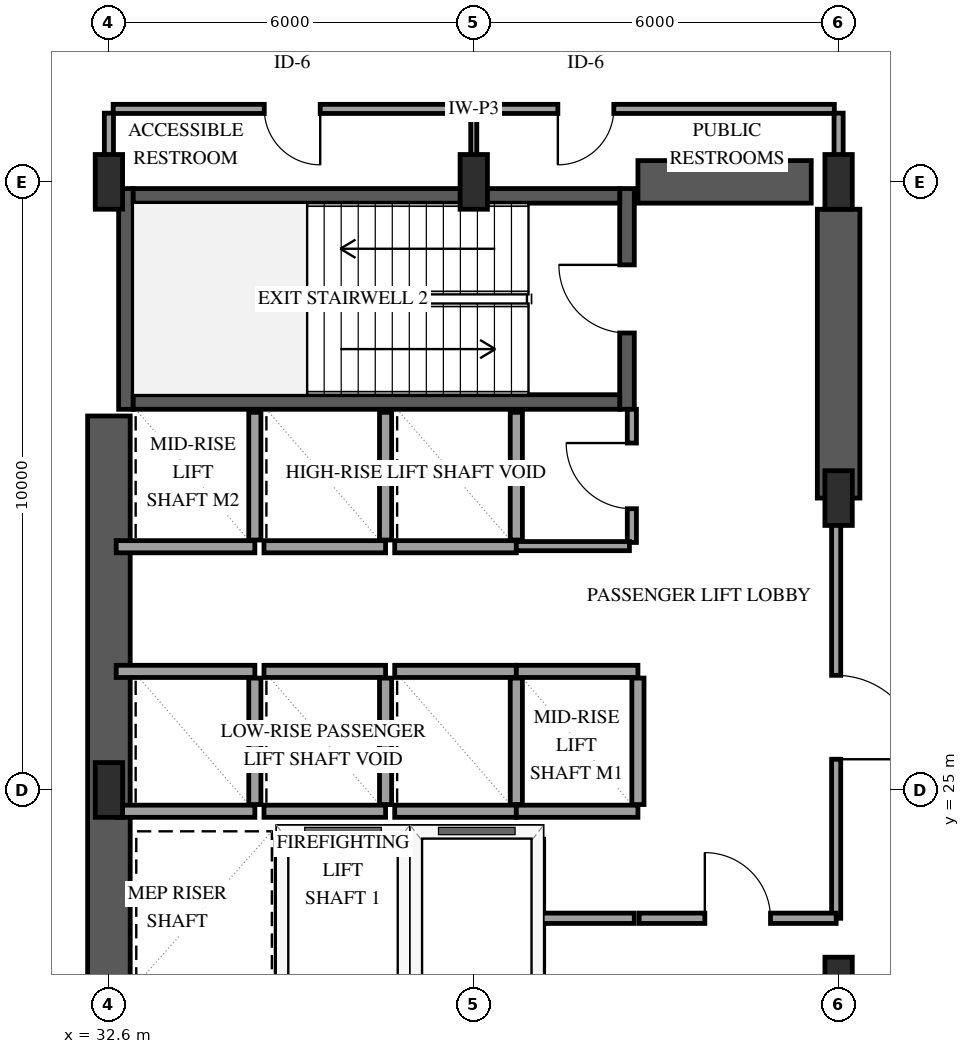
"""IFC4 building model, lengths in metres.
Left out: names, types, materials, properties, quantities, classifications, styles, units other than length and angle.
Written with IfcOpenShell. Run it as: python <this file> out.ifc"""

import sys

from ifc_helpers import new_model, si_unit, direction, frame, frame_2d, origin, origin_2d, place, context, subcontext, project, spatial, rectangle, extrude, element, fill, save


model = new_model("IFC4")
c1 = context("Model", 3, precision=1e-05, world=origin(), true_north=direction((0.0, 1.0)))
c2 = subcontext(c1, "Body", "Model", "MODEL_VIEW")
j1 = project(units=[si_unit("LENGTHUNIT", "METRE"), si_unit("PLANEANGLEUNIT", "RADIAN")], contexts=[c1])
p1 = place(None, origin())
s1 = spatial("IfcSite", under=j1, at=p1, CompositionType="ELEMENT")
p2 = place(p1, origin())
s2 = spatial("IfcBuilding", under=s1, at=p2, CompositionType="ELEMENT")
p3 = place(p2, frame((0.0, 0.0, 11.4)))
s3 = spatial("IfcBuildingStorey", under=s2, at=p3, CompositionType="ELEMENT", Elevation=11.4)
p4 = place(p3, frame((32.88, 31.26, 0.0), z_axis=(0.0, 0.0, 1.0), x_axis=(0.0, 1.0, 0.0)))
e1 = element("IfcWall", 1, at=p4, inside=s3, PredefinedType="SHEAR", context=c2, shape_type="SweptSolid", body=[
    extrude(rectangle(XDim=3.63, YDim=0.24, at=frame_2d((1.815, 0.0))), origin(), (0.0, 0.0, 1.0), 4.8),
])
p5 = place(p3, frame((41.12, 31.26, 0.0), z_axis=(0.0, 0.0, 1.0), x_axis=(0.0, 1.0, 0.0)))
e2 = element("IfcWall", 2, at=p5, inside=s3, PredefinedType="SHEAR", context=c2, shape_type="SweptSolid", body=[
    extrude(rectangle(XDim=3.63, YDim=0.24, at=frame_2d((1.815, 0.0))), origin(), (0.0, 0.0, 1.0), 4.8),
])
p6 = place(p5, frame((1.255, 0.0, 0.0)))
e3 = element("IfcOpeningElement", 3, at=p6, cuts=e2, PredefinedType="OPENING", context=c2, shape_type="SweptSolid", body=[
    extrude(rectangle(XDim=1.12, YDim=2.15, at=frame_2d((0.56, 1.075))), frame((0.0, 0.13, 0.0), z_axis=(0.0, -1.0, 0.0), x_axis=(1.0, 0.0, 0.0)), (0.0, 0.0, 1.0), 0.26),
])
for number, where, z_axis, x_axis in (
    (4, (33.0, 31.38, 0.0), (0.0, 0.0, 1.0), (1.0, 0.0, 0.0)),
    (5, (33.0, 34.77, 0.0), (0.0, 0.0, 1.0), (1.0, 0.0, 0.0)),
):
    element("IfcWall", number, at=place(p3, frame(where, z_axis=z_axis, x_axis=x_axis)), inside=s3, PredefinedType="SHEAR", context=c2, shape_type="SweptSolid", body=[
        extrude(rectangle(XDim=8.0, YDim=0.24, at=frame_2d((4.0, 0.0))), origin(), (0.0, 0.0, 1.0), 4.8),
    ])
p7 = place(p3, frame((32.6, 18.85, 0.0), z_axis=(0.0, 0.0, 1.0), x_axis=(0.0, 1.0, 0.0)))
e6 = element("IfcWall", 6, at=p7, inside=s3, PredefinedType="SHEAR", context=c2, shape_type="SweptSolid", body=[
    extrude(rectangle(XDim=12.3, YDim=0.7, at=frame_2d((6.15, 0.0))), origin(), (0.0, 0.0, 1.0), 4.8),
])
p8 = place(p3, frame((41.3, 35.0, 0.0), z_axis=(0.0, 0.0, 1.0), x_axis=(1.0, 0.0, 0.0)))
e7 = element("IfcWall", 7, at=p8, inside=s3, PredefinedType="SHEAR", context=c2, shape_type="SweptSolid", body=[
    extrude(rectangle(XDim=2.85, YDim=0.7, at=frame_2d((1.425, 0.0))), origin(), (0.0, 0.0, 1.0), 4.8),
])
p9 = place(p3, frame((44.6, 29.8, 0.0), z_axis=(0.0, 0.0, 1.0), x_axis=(0.0, 1.0, 0.0)))
e8 = element("IfcWall", 8, at=p9, inside=s3, PredefinedType="SHEAR", context=c2, shape_type="SweptSolid", body=[
    extrude(rectangle(XDim=4.75, YDim=0.7, at=frame_2d((2.375, 0.0))), origin(), (0.0, 0.0, 1.0), 4.8),
])
for number, where, z_axis, x_axis in (
    (9, (32.6, 25.0, 0.0), (0.0, 0.0, 1.0), (1.0, 0.0, 0.0)),
    (10, (32.6, 35.0, 0.0), (0.0, 0.0, 1.0), (1.0, 0.0, 0.0)),
    (11, (38.6, 35.0, 0.0), (0.0, 0.0, 1.0), (1.0, 0.0, 0.0)),
    (12, (44.6, 21.8, 0.0), (0.0, 0.0, 1.0), (1.0, 0.0, 0.0)),
    (13, (44.6, 29.8, 0.0), (0.0, 0.0, 1.0), (1.0, 0.0, 0.0)),
    (14, (44.6, 35.0, 0.0), (0.0, 0.0, 1.0), (1.0, 0.0, 0.0)),
):
    element("IfcColumn", number, at=place(p3, frame(where, z_axis=z_axis, x_axis=x_axis)), inside=s3, PredefinedType="PILASTER", context=c2, shape_type="SweptSolid", body=[
        extrude(rectangle(XDim=0.45, YDim=0.9, at=origin_2d()), origin(), (0.0, 0.0, 1.0), 4.8),
    ])
p10 = place(p3, frame((35.45, 24.3, 0.0), z_axis=(0.0, 0.0, 1.0), x_axis=(1.0, 0.0, 0.0)))
e15 = element("IfcWall", 15, at=p10, inside=s3, PredefinedType="SOLIDWALL", context=c2, shape_type="SweptSolid", body=[
    extrude(rectangle(XDim=2.0, YDim=0.2, at=frame_2d((1.0, 0.0))), origin(), (0.0, 0.0, 1.0), 4.48),
])
for number, where, z_axis, x_axis in (
    (16, (35.45, 21.81, 0.0), (0.0, 0.0, 1.0), (0.0, 1.0, 0.0)),
    (17, (37.45, 21.81, 0.0), (0.0, 0.0, 1.0), (0.0, 1.0, 0.0)),
):
    element("IfcWall", number, at=place(p3, frame(where, z_axis=z_axis, x_axis=x_axis)), inside=s3, PredefinedType="SOLIDWALL", context=c2, shape_type="SweptSolid", body=[
        extrude(rectangle(XDim=2.38, YDim=0.2, at=frame_2d((1.19, 0.0))), origin(), (0.0, 0.0, 1.0), 4.48),
    ])
p11 = place(p3, frame((37.65, 24.3, 0.0), z_axis=(0.0, 0.0, 1.0), x_axis=(1.0, 0.0, 0.0)))
e18 = element("IfcWall", 18, at=p11, inside=s3, PredefinedType="SOLIDWALL", context=c2, shape_type="SweptSolid", body=[
    extrude(rectangle(XDim=2.0, YDim=0.2, at=frame_2d((1.0, 0.0))), origin(), (0.0, 0.0, 1.0), 4.48),
])
p12 = place(p3, frame((39.65, 21.81, 0.0), z_axis=(0.0, 0.0, 1.0), x_axis=(0.0, 1.0, 0.0)))
e19 = element("IfcWall", 19, at=p12, inside=s3, PredefinedType="SOLIDWALL", context=c2, shape_type="SweptSolid", body=[
    extrude(rectangle(XDim=2.38, YDim=0.2, at=frame_2d((1.19, 0.0))), origin(), (0.0, 0.0, 1.0), 4.48),
])
for number, where, z_axis, x_axis in (
    (20, (32.72, 24.65, 0.0), (0.0, 0.0, 1.0), (1.0, 0.0, 0.0)),
    (21, (32.72, 26.95, 0.0), (0.0, 0.0, 1.0), (1.0, 0.0, 0.0)),
):
    element("IfcWall", number, at=place(p3, frame(where, z_axis=z_axis, x_axis=x_axis)), inside=s3, PredefinedType="SOLIDWALL", context=c2, shape_type="SweptSolid", body=[
        extrude(rectangle(XDim=2.28, YDim=0.2, at=frame_2d((1.14, 0.0))), origin(), (0.0, 0.0, 1.0), 4.48),
    ])
p13 = place(p3, frame((35.0, 24.76, 0.0), z_axis=(0.0, 0.0, 1.0), x_axis=(0.0, 1.0, 0.0)))
e22 = element("IfcWall", 22, at=p13, inside=s3, PredefinedType="SOLIDWALL", context=c2, shape_type="SweptSolid", body=[
    extrude(rectangle(XDim=2.08, YDim=0.2, at=frame_2d((1.04, 0.0))), origin(), (0.0, 0.0, 1.0), 4.48),
])
for number, where, z_axis, x_axis in (
    (23, (35.15, 24.65, 0.0), (0.0, 0.0, 1.0), (1.0, 0.0, 0.0)),
    (24, (35.15, 26.95, 0.0), (0.0, 0.0, 1.0), (1.0, 0.0, 0.0)),
):
    element("IfcWall", number, at=place(p3, frame(where, z_axis=z_axis, x_axis=x_axis)), inside=s3, PredefinedType="SOLIDWALL", context=c2, shape_type="SweptSolid", body=[
        extrude(rectangle(XDim=2.0, YDim=0.2, at=frame_2d((1.0, 0.0))), origin(), (0.0, 0.0, 1.0), 4.48),
    ])
p14 = place(p3, frame((37.15, 24.76, 0.0), z_axis=(0.0, 0.0, 1.0), x_axis=(0.0, 1.0, 0.0)))
e25 = element("IfcWall", 25, at=p14, inside=s3, PredefinedType="SOLIDWALL", context=c2, shape_type="SweptSolid", body=[
    extrude(rectangle(XDim=2.08, YDim=0.2, at=frame_2d((1.04, 0.0))), origin(), (0.0, 0.0, 1.0), 4.48),
])
for number, where, z_axis, x_axis in (
    (26, (37.3, 24.65, 0.0), (0.0, 0.0, 1.0), (1.0, 0.0, 0.0)),
    (27, (37.3, 26.95, 0.0), (0.0, 0.0, 1.0), (1.0, 0.0, 0.0)),
):
    element("IfcWall", number, at=place(p3, frame(where, z_axis=z_axis, x_axis=x_axis)), inside=s3, PredefinedType="SOLIDWALL", context=c2, shape_type="SweptSolid", body=[
        extrude(rectangle(XDim=2.0, YDim=0.2, at=frame_2d((1.0, 0.0))), origin(), (0.0, 0.0, 1.0), 4.48),
    ])
p15 = place(p3, frame((39.3, 24.76, 0.0), z_axis=(0.0, 0.0, 1.0), x_axis=(0.0, 1.0, 0.0)))
e28 = element("IfcWall", 28, at=p15, inside=s3, PredefinedType="SOLIDWALL", context=c2, shape_type="SweptSolid", body=[
    extrude(rectangle(XDim=2.08, YDim=0.2, at=frame_2d((1.04, 0.0))), origin(), (0.0, 0.0, 1.0), 4.48),
])
for number, where, z_axis, x_axis in (
    (29, (39.3, 24.65, 0.0), (0.0, 0.0, 1.0), (1.0, 0.0, 0.0)),
    (30, (39.3, 26.95, 0.0), (0.0, 0.0, 1.0), (1.0, 0.0, 0.0)),
):
    element("IfcWall", number, at=place(p3, frame(where, z_axis=z_axis, x_axis=x_axis)), inside=s3, PredefinedType="SOLIDWALL", context=c2, shape_type="SweptSolid", body=[
        extrude(rectangle(XDim=2.0, YDim=0.2, at=frame_2d((1.0, 0.0))), origin(), (0.0, 0.0, 1.0), 4.48),
    ])
p16 = place(p3, frame((41.3, 24.76, 0.0), z_axis=(0.0, 0.0, 1.0), x_axis=(0.0, 1.0, 0.0)))
e31 = element("IfcWall", 31, at=p16, inside=s3, PredefinedType="SOLIDWALL", context=c2, shape_type="SweptSolid", body=[
    extrude(rectangle(XDim=2.08, YDim=0.2, at=frame_2d((1.04, 0.0))), origin(), (0.0, 0.0, 1.0), 4.48),
])
p17 = place(p3, frame((32.72, 29.0, 0.0), z_axis=(0.0, 0.0, 1.0), x_axis=(1.0, 0.0, 0.0)))
e32 = element("IfcWall", 32, at=p17, inside=s3, PredefinedType="SOLIDWALL", context=c2, shape_type="SweptSolid", body=[
    extrude(rectangle(XDim=2.28, YDim=0.2, at=frame_2d((1.14, 0.0))), origin(), (0.0, 0.0, 1.0), 4.48),
])
p18 = place(p3, frame((35.0, 29.11, 0.0), z_axis=(0.0, 0.0, 1.0), x_axis=(0.0, 1.0, 0.0)))
e33 = element("IfcWall", 33, at=p18, inside=s3, PredefinedType="SOLIDWALL", context=c2, shape_type="SweptSolid", body=[
    extrude(rectangle(XDim=2.1, YDim=0.2, at=frame_2d((1.05, 0.0))), origin(), (0.0, 0.0, 1.0), 4.48),
])
p19 = place(p3, frame((35.15, 29.0, 0.0), z_axis=(0.0, 0.0, 1.0), x_axis=(1.0, 0.0, 0.0)))
e34 = element("IfcWall", 34, at=p19, inside=s3, PredefinedType="SOLIDWALL", context=c2, shape_type="SweptSolid", body=[
    extrude(rectangle(XDim=2.0, YDim=0.2, at=frame_2d((1.0, 0.0))), origin(), (0.0, 0.0, 1.0), 4.48),
])
p20 = place(p3, frame((37.15, 29.11, 0.0), z_axis=(0.0, 0.0, 1.0), x_axis=(0.0, 1.0, 0.0)))
e35 = element("IfcWall", 35, at=p20, inside=s3, PredefinedType="SOLIDWALL", context=c2, shape_type="SweptSolid", body=[
    extrude(rectangle(XDim=2.1, YDim=0.2, at=frame_2d((1.05, 0.0))), origin(), (0.0, 0.0, 1.0), 4.48),
])
p21 = place(p3, frame((37.3, 29.0, 0.0), z_axis=(0.0, 0.0, 1.0), x_axis=(1.0, 0.0, 0.0)))
e36 = element("IfcWall", 36, at=p21, inside=s3, PredefinedType="SOLIDWALL", context=c2, shape_type="SweptSolid", body=[
    extrude(rectangle(XDim=2.0, YDim=0.2, at=frame_2d((1.0, 0.0))), origin(), (0.0, 0.0, 1.0), 4.48),
])
p22 = place(p3, frame((39.3, 29.11, 0.0), z_axis=(0.0, 0.0, 1.0), x_axis=(0.0, 1.0, 0.0)))
e37 = element("IfcWall", 37, at=p22, inside=s3, PredefinedType="SOLIDWALL", context=c2, shape_type="SweptSolid", body=[
    extrude(rectangle(XDim=2.1, YDim=0.2, at=frame_2d((1.05, 0.0))), origin(), (0.0, 0.0, 1.0), 4.48),
])
p23 = place(p3, frame((44.56, 29.8, 0.0), z_axis=(0.0, 0.0, 1.0), x_axis=(0.0, -1.0, 0.0)))
e38 = element("IfcWall", 38, at=p23, inside=s3, PredefinedType="PARTITIONING", context=c2, shape_type="SweptSolid", body=[
    extrude(rectangle(XDim=6.91, YDim=0.15, at=frame_2d((3.455, 0.0))), origin(), (0.0, 0.0, 1.0), 3.52),
])
p24 = place(p23, frame((2.915, 0.0, 0.0)))
e39 = element("IfcOpeningElement", 39, at=p24, cuts=e38, PredefinedType="OPENING", context=c2, shape_type="SweptSolid", body=[
    extrude(rectangle(XDim=1.38, YDim=2.2, at=frame_2d((0.69, 1.1))), frame((0.0, 0.085, 0.0), z_axis=(0.0, -1.0, 0.0), x_axis=(1.0, 0.0, 0.0)), (0.0, 0.0, 1.0), 0.17),
])
p25 = place(p3, frame((38.53, 36.2, 0.0), z_axis=(0.0, 0.0, 1.0), x_axis=(-1.0, 0.0, 0.0)))
e40 = element("IfcWall", 40, at=p25, inside=s3, PredefinedType="PARTITIONING", context=c2, shape_type="SweptSolid", body=[
    extrude(rectangle(XDim=5.86, YDim=0.15, at=frame_2d((2.93, 0.0))), origin(), (0.0, 0.0, 1.0), 4.48),
])
p26 = place(p25, frame((2.455, 0.0, 0.0)))
e41 = element("IfcOpeningElement", 41, at=p26, cuts=e40, PredefinedType="OPENING", context=c2, shape_type="SweptSolid", body=[
    extrude(rectangle(XDim=0.92, YDim=2.12, at=frame_2d((0.46, 1.06))), frame((0.0, 0.085, 0.0), z_axis=(0.0, -1.0, 0.0), x_axis=(1.0, 0.0, 0.0)), (0.0, 0.0, 1.0), 0.17),
])
p27 = place(p3, frame((44.53, 36.2, 0.0), z_axis=(0.0, 0.0, 1.0), x_axis=(-1.0, 0.0, 0.0)))
e42 = element("IfcWall", 42, at=p27, inside=s3, PredefinedType="PARTITIONING", context=c2, shape_type="SweptSolid", body=[
    extrude(rectangle(XDim=5.86, YDim=0.15, at=frame_2d((2.93, 0.0))), origin(), (0.0, 0.0, 1.0), 4.48),
])
p28 = place(p27, frame((3.627, 0.0, 0.0)))
e43 = element("IfcOpeningElement", 43, at=p28, cuts=e42, PredefinedType="OPENING", context=c2, shape_type="SweptSolid", body=[
    extrude(rectangle(XDim=0.92, YDim=2.12, at=frame_2d((0.46, 1.06))), frame((0.0, 0.085, 0.0), z_axis=(0.0, -1.0, 0.0), x_axis=(1.0, 0.0, 0.0)), (0.0, 0.0, 1.0), 0.17),
])
p29 = place(p3, frame((41.32, 22.89, 0.0), z_axis=(0.0, 0.0, 1.0), x_axis=(1.0, 0.0, 0.0)))
e44 = element("IfcWall", 44, at=p29, inside=s3, PredefinedType="PARTITIONING", context=c2, shape_type="SweptSolid", body=[
    extrude(rectangle(XDim=3.24, YDim=0.17, at=frame_2d((1.62, 0.0))), origin(), (0.0, 0.0, 1.0), 4.48),
])
p30 = place(p29, frame((1.08, 0.0, 0.0)))
e45 = element("IfcOpeningElement", 45, at=p30, cuts=e44, PredefinedType="OPENING", context=c2, shape_type="SweptSolid", body=[
    extrude(rectangle(XDim=1.08, YDim=2.15, at=frame_2d((0.54, 1.075))), frame((0.0, 0.095, 0.0), z_axis=(0.0, -1.0, 0.0), x_axis=(1.0, 0.0, 0.0)), (0.0, 0.0, 1.0), 0.19),
])
p31 = place(p3, frame((41.2, 29.07, 0.0), z_axis=(0.0, 0.0, 1.0), x_axis=(0.0, 1.0, 0.0)))
e46 = element("IfcWall", 46, at=p31, inside=s3, PredefinedType="PARTITIONING", context=c2, shape_type="SweptSolid", body=[
    extrude(rectangle(XDim=2.19, YDim=0.15, at=frame_2d((1.095, 0.0))), origin(), (0.0, 0.0, 1.0), 4.48),
])
p32 = place(p31, frame((0.555, 0.0, 0.0)))
e47 = element("IfcOpeningElement", 47, at=p32, cuts=e46, PredefinedType="OPENING", context=c2, shape_type="SweptSolid", body=[
    extrude(rectangle(XDim=1.08, YDim=2.15, at=frame_2d((0.54, 1.075))), frame((0.0, 0.085, 0.0), z_axis=(0.0, -1.0, 0.0), x_axis=(1.0, 0.0, 0.0)), (0.0, 0.0, 1.0), 0.17),
])
p33 = place(p3, frame((39.3, 29.01, 0.0), z_axis=(0.0, 0.0, 1.0), x_axis=(1.0, 0.0, 0.0)))
e48 = element("IfcWall", 48, at=p33, inside=s3, PredefinedType="PARTITIONING", context=c2, shape_type="SweptSolid", body=[
    extrude(rectangle(XDim=1.86, YDim=0.15, at=frame_2d((0.93, 0.0))), origin(), (0.0, 0.0, 1.0), 4.48),
])
p34 = place(p3, frame((39.72, 22.89, 0.0), z_axis=(0.0, 0.0, 1.0), x_axis=(1.0, 0.0, 0.0)))
e49 = element("IfcWall", 49, at=p34, inside=s3, PredefinedType="PARTITIONING", context=c2, shape_type="SweptSolid", body=[
    extrude(rectangle(XDim=1.52, YDim=0.17, at=frame_2d((0.76, 0.0))), origin(), (0.0, 0.0, 1.0), 4.48),
])
for number, where, z_axis, x_axis in (
    (50, (32.6, 36.13, 0.0), (0.0, 0.0, 1.0), (0.0, -1.0, 0.0)),
    (51, (44.6, 35.07, 0.0), (0.0, 0.0, 1.0), (0.0, 1.0, 0.0)),
):
    element("IfcWall", number, at=place(p3, frame(where, z_axis=z_axis, x_axis=x_axis)), inside=s3, PredefinedType="PARTITIONING", context=c2, shape_type="SweptSolid", body=[
        extrude(rectangle(XDim=1.06, YDim=0.15, at=frame_2d((0.53, 0.0))), origin(), (0.0, 0.0, 1.0), 3.602),
    ])
p35 = place(p3, frame((38.6, 36.13, 0.0), z_axis=(0.0, 0.0, 1.0), x_axis=(0.0, -1.0, 0.0)))
e52 = element("IfcWall", 52, at=p35, inside=s3, PredefinedType="PARTITIONING", context=c2, shape_type="SweptSolid", body=[
    extrude(rectangle(XDim=1.06, YDim=0.1, at=frame_2d((0.53, 0.0))), origin(), (0.0, 0.0, 1.0), 4.48),
])
p36 = place(p6, origin())
e53 = element("IfcDoor", 53, at=p36, inside=s3, OperationType="SINGLE_SWING_RIGHT", PredefinedType="DOOR", context=c2, shape_type="SweptSolid", body=[
    extrude(rectangle(XDim=1.12, YDim=2.15, at=frame_2d((0.56, 1.075))), frame((0.0, 0.025, 0.0), z_axis=(0.0, -1.0, 0.0), x_axis=(1.0, 0.0, 0.0)), (0.0, 0.0, 1.0), 0.05),
])
fill(e3, e53)
p37 = place(p24, origin())
e54 = element("IfcDoor", 54, at=p37, inside=s3, OperationType="SINGLE_SWING_RIGHT", PredefinedType="DOOR", context=c2, shape_type="SweptSolid", body=[
    extrude(rectangle(XDim=1.38, YDim=2.2, at=frame_2d((0.69, 1.1))), frame((0.0, 0.025, 0.0), z_axis=(0.0, -1.0, 0.0), x_axis=(1.0, 0.0, 0.0)), (0.0, 0.0, 1.0), 0.05),
])
fill(e39, e54)
p38 = place(p26, origin())
e55 = element("IfcDoor", 55, at=p38, inside=s3, OperationType="SINGLE_SWING_LEFT", PredefinedType="DOOR", context=c2, shape_type="SweptSolid", body=[
    extrude(rectangle(XDim=0.92, YDim=2.12, at=frame_2d((0.46, 1.06))), frame((0.0, 0.025, 0.0), z_axis=(0.0, -1.0, 0.0), x_axis=(1.0, 0.0, 0.0)), (0.0, 0.0, 1.0), 0.05),
])
fill(e41, e55)
p39 = place(p28, origin())
e56 = element("IfcDoor", 56, at=p39, inside=s3, OperationType="SINGLE_SWING_RIGHT", PredefinedType="DOOR", context=c2, shape_type="SweptSolid", body=[
    extrude(rectangle(XDim=0.92, YDim=2.12, at=frame_2d((0.46, 1.06))), frame((0.0, 0.025, 0.0), z_axis=(0.0, -1.0, 0.0), x_axis=(1.0, 0.0, 0.0)), (0.0, 0.0, 1.0), 0.05),
])
fill(e43, e56)
p40 = place(p30, origin())
e57 = element("IfcDoor", 57, at=p40, inside=s3, OperationType="SINGLE_SWING_LEFT", PredefinedType="DOOR", context=c2, shape_type="SweptSolid", body=[
    extrude(rectangle(XDim=1.08, YDim=2.15, at=frame_2d((0.54, 1.075))), frame((0.0, 0.025, 0.0), z_axis=(0.0, -1.0, 0.0), x_axis=(1.0, 0.0, 0.0)), (0.0, 0.0, 1.0), 0.05),
])
fill(e45, e57)
p41 = place(p32, origin())
e58 = element("IfcDoor", 58, at=p41, inside=s3, OperationType="SINGLE_SWING_RIGHT", PredefinedType="DOOR", context=c2, shape_type="SweptSolid", body=[
    extrude(rectangle(XDim=1.08, YDim=2.15, at=frame_2d((0.54, 1.075))), frame((0.0, 0.025, 0.0), z_axis=(0.0, -1.0, 0.0), x_axis=(1.0, 0.0, 0.0)), (0.0, 0.0, 1.0), 0.05),
])
fill(e47, e58)
save(model, sys.argv[1])
